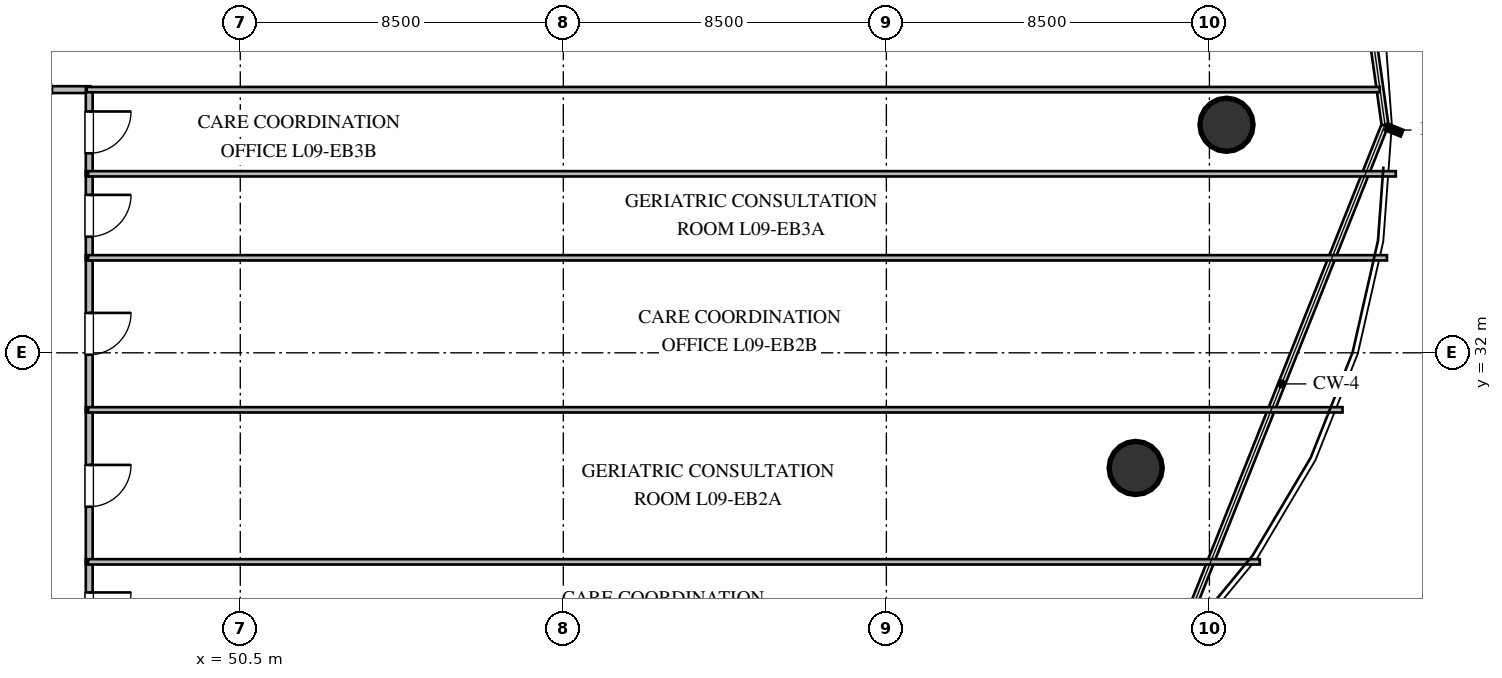
"""IFC4 building model, lengths in metres.
Left out: names, types, materials, properties, quantities, classifications, styles, units other than length and angle.
Written with IfcOpenShell. Run it as: python <this file> out.ifc"""

import sys

from ifc_helpers import new_model, si_unit, direction, frame, frame_2d, origin, origin_2d, place, context, subcontext, project, spatial, rectangle, circle, extrude, element, fill, save


model = new_model("IFC4")
c1 = context("Model", 3, precision=1e-05, world=origin(), true_north=direction((0.0, 1.0)))
c2 = subcontext(c1, "Body", "Model", "MODEL_VIEW")
j1 = project(units=[si_unit("LENGTHUNIT", "METRE"), si_unit("PLANEANGLEUNIT", "RADIAN")], contexts=[c1])
p1 = place(None, origin())
s1 = spatial("IfcSite", under=j1, at=p1, CompositionType="ELEMENT")
p2 = place(p1, origin())
s2 = spatial("IfcBuilding", under=s1, at=p2, CompositionType="ELEMENT")
p3 = place(p2, frame((0.0, 0.0, 38.4)))
s3 = spatial("IfcBuildingStorey", under=s2, at=p3, CompositionType="ELEMENT", Elevation=38.4)
for number, where, z_axis, x_axis in (
    (1, (76.45, 38.0, 0.0), (0.0, 0.0, 1.0), (1.0, 0.0, 0.0)),
    (2, (74.06, 28.97, 0.0), (0.0, 0.0, 1.0), (1.0, 0.0, 0.0)),
):
    element("IfcColumn", number, at=place(p3, frame(where, z_axis=z_axis, x_axis=x_axis)), inside=s3, PredefinedType="COLUMN", context=c2, shape_type="SweptSolid", body=[
        extrude(circle(Radius=0.7, at=origin_2d()), origin(), (0.0, 0.0, 1.0), 3.6),
    ])
p4 = place(p3, frame((43.435, 38.925, 0.0), z_axis=(0.0, 0.0, 1.0), x_axis=(1.0, 0.0, 0.0)))
e3 = element("IfcWall", 3, at=p4, inside=s3, PredefinedType="PARTITIONING", context=c2, shape_type="SweptSolid", body=[
    extrude(rectangle(XDim=3.12, YDim=0.18, at=frame_2d((1.56, 0.0))), origin(), (0.0, 0.0, 1.0), 3.36),
])
p5 = place(p4, frame((1.01, 0.0, 0.0)))
e4 = element("IfcOpeningElement", 4, at=p5, cuts=e3, PredefinedType="OPENING", context=c2, shape_type="SweptSolid", body=[
    extrude(rectangle(XDim=1.1, YDim=2.1, at=frame_2d((0.55, 1.05))), frame((0.0, 0.1, 0.0), z_axis=(0.0, -1.0, 0.0), x_axis=(1.0, 0.0, 0.0)), (0.0, 0.0, 1.0), 0.2),
])
p6 = place(p3, frame((46.525, 26.565, 0.0), z_axis=(0.0, 0.0, 1.0), x_axis=(0.0, -1.0, 0.0)))
e5 = element("IfcWall", 5, at=p6, inside=s3, PredefinedType="PARTITIONING", context=c2, shape_type="SweptSolid", body=[
    extrude(rectangle(XDim=2.84, YDim=0.18, at=frame_2d((1.42, 0.0))), origin(), (0.0, 0.0, 1.0), 3.36),
])
p7 = place(p6, frame((0.87, 0.0, 0.0)))
e6 = element("IfcOpeningElement", 6, at=p7, cuts=e5, PredefinedType="OPENING", context=c2, shape_type="SweptSolid", body=[
    extrude(rectangle(XDim=1.1, YDim=2.1, at=frame_2d((0.55, 1.05))), frame((0.0, 0.1, 0.0), z_axis=(0.0, -1.0, 0.0), x_axis=(1.0, 0.0, 0.0)), (0.0, 0.0, 1.0), 0.2),
])
p8 = place(p3, frame((46.525, 30.565, 0.0), z_axis=(0.0, 0.0, 1.0), x_axis=(0.0, -1.0, 0.0)))
e7 = element("IfcWall", 7, at=p8, inside=s3, PredefinedType="PARTITIONING", context=c2, shape_type="SweptSolid", body=[
    extrude(rectangle(XDim=4.13, YDim=0.18, at=frame_2d((2.065, 0.0))), origin(), (0.0, 0.0, 1.0), 3.36),
])
p9 = place(p8, frame((1.515, 0.0, 0.0)))
e8 = element("IfcOpeningElement", 8, at=p9, cuts=e7, PredefinedType="OPENING", context=c2, shape_type="SweptSolid", body=[
    extrude(rectangle(XDim=1.1, YDim=2.1, at=frame_2d((0.55, 1.05))), frame((0.0, 0.1, 0.0), z_axis=(0.0, -1.0, 0.0), x_axis=(1.0, 0.0, 0.0)), (0.0, 0.0, 1.0), 0.2),
])
p10 = place(p3, frame((46.525, 34.565, 0.0), z_axis=(0.0, 0.0, 1.0), x_axis=(0.0, -1.0, 0.0)))
e9 = element("IfcWall", 9, at=p10, inside=s3, PredefinedType="PARTITIONING", context=c2, shape_type="SweptSolid", body=[
    extrude(rectangle(XDim=4.13, YDim=0.18, at=frame_2d((2.065, 0.0))), origin(), (0.0, 0.0, 1.0), 3.36),
])
p11 = place(p10, frame((1.515, 0.0, 0.0)))
e10 = element("IfcOpeningElement", 10, at=p11, cuts=e9, PredefinedType="OPENING", context=c2, shape_type="SweptSolid", body=[
    extrude(rectangle(XDim=1.1, YDim=2.1, at=frame_2d((0.55, 1.05))), frame((0.0, 0.1, 0.0), z_axis=(0.0, -1.0, 0.0), x_axis=(1.0, 0.0, 0.0)), (0.0, 0.0, 1.0), 0.2),
])
p12 = place(p3, frame((46.525, 36.775, 0.0), z_axis=(0.0, 0.0, 1.0), x_axis=(0.0, -1.0, 0.0)))
e11 = element("IfcWall", 11, at=p12, inside=s3, PredefinedType="PARTITIONING", context=c2, shape_type="SweptSolid", body=[
    extrude(rectangle(XDim=2.34, YDim=0.18, at=frame_2d((1.17, 0.0))), origin(), (0.0, 0.0, 1.0), 3.36),
])
p13 = place(p12, frame((0.62, 0.0, 0.0)))
e12 = element("IfcOpeningElement", 12, at=p13, cuts=e11, PredefinedType="OPENING", context=c2, shape_type="SweptSolid", body=[
    extrude(rectangle(XDim=1.1, YDim=2.1, at=frame_2d((0.55, 1.05))), frame((0.0, 0.1, 0.0), z_axis=(0.0, -1.0, 0.0), x_axis=(1.0, 0.0, 0.0)), (0.0, 0.0, 1.0), 0.2),
])
p14 = place(p3, frame((46.525, 38.955, 0.0), z_axis=(0.0, 0.0, 1.0), x_axis=(0.0, -1.0, 0.0)))
e13 = element("IfcWall", 13, at=p14, inside=s3, PredefinedType="PARTITIONING", context=c2, shape_type="SweptSolid", body=[
    extrude(rectangle(XDim=2.31, YDim=0.18, at=frame_2d((1.155, 0.0))), origin(), (0.0, 0.0, 1.0), 3.36),
])
p15 = place(p14, frame((0.605, 0.0, 0.0)))
e14 = element("IfcOpeningElement", 14, at=p15, cuts=e13, PredefinedType="OPENING", context=c2, shape_type="SweptSolid", body=[
    extrude(rectangle(XDim=1.1, YDim=2.1, at=frame_2d((0.55, 1.05))), frame((0.0, 0.1, 0.0), z_axis=(0.0, -1.0, 0.0), x_axis=(1.0, 0.0, 0.0)), (0.0, 0.0, 1.0), 0.2),
])
p16 = place(p3, frame((80.48, 38.925, 0.0), z_axis=(0.0, 0.0, 1.0), x_axis=(-1.0, 0.0, 0.0)))
e15 = element("IfcWall", 15, at=p16, inside=s3, PredefinedType="PARTITIONING", context=c2, shape_type="SweptSolid", body=[
    extrude(rectangle(XDim=34.02, YDim=0.14, at=frame_2d((17.01, 0.0))), origin(), (0.0, 0.0, 1.0), 3.36),
])
p17 = place(p3, frame((46.495, 26.5, 0.0), z_axis=(0.0, 0.0, 1.0), x_axis=(1.0, 0.0, 0.0)))
e16 = element("IfcWall", 16, at=p17, inside=s3, PredefinedType="PARTITIONING", context=c2, shape_type="SweptSolid", body=[
    extrude(rectangle(XDim=30.831, YDim=0.14, at=frame_2d((15.416, 0.0))), origin(), (0.0, 0.0, 1.0), 2.89),
])
p18 = place(p3, frame((46.495, 30.5, 0.0), z_axis=(0.0, 0.0, 1.0), x_axis=(1.0, 0.0, 0.0)))
e17 = element("IfcWall", 17, at=p18, inside=s3, PredefinedType="PARTITIONING", context=c2, shape_type="SweptSolid", body=[
    extrude(rectangle(XDim=33.008, YDim=0.14, at=frame_2d((16.504, 0.0))), origin(), (0.0, 0.0, 1.0), 3.36),
])
p19 = place(p3, frame((46.495, 34.5, 0.0), z_axis=(0.0, 0.0, 1.0), x_axis=(1.0, 0.0, 0.0)))
e18 = element("IfcWall", 18, at=p19, inside=s3, PredefinedType="PARTITIONING", context=c2, shape_type="SweptSolid", body=[
    extrude(rectangle(XDim=34.177, YDim=0.14, at=frame_2d((17.088, 0.0))), origin(), (0.0, 0.0, 1.0), 3.36),
])
p20 = place(p3, frame((46.495, 36.71, 0.0), z_axis=(0.0, 0.0, 1.0), x_axis=(1.0, 0.0, 0.0)))
e19 = element("IfcWall", 19, at=p20, inside=s3, PredefinedType="PARTITIONING", context=c2, shape_type="SweptSolid", body=[
    extrude(rectangle(XDim=34.41, YDim=0.14, at=frame_2d((17.205, 0.0))), origin(), (0.0, 0.0, 1.0), 2.89),
])
p21 = place(p7, origin())
e20 = element("IfcDoor", 20, at=p21, inside=s3, OperationType="SINGLE_SWING_LEFT", PredefinedType="DOOR", context=c2, shape_type="SweptSolid", body=[
    extrude(rectangle(XDim=1.1, YDim=2.1, at=frame_2d((0.55, 1.05))), frame((0.0, 0.025, 0.0), z_axis=(0.0, -1.0, 0.0), x_axis=(1.0, 0.0, 0.0)), (0.0, 0.0, 1.0), 0.05),
])
fill(e6, e20)
p22 = place(p9, origin())
e21 = element("IfcDoor", 21, at=p22, inside=s3, OperationType="SINGLE_SWING_LEFT", PredefinedType="DOOR", context=c2, shape_type="SweptSolid", body=[
    extrude(rectangle(XDim=1.1, YDim=2.1, at=frame_2d((0.55, 1.05))), frame((0.0, 0.025, 0.0), z_axis=(0.0, -1.0, 0.0), x_axis=(1.0, 0.0, 0.0)), (0.0, 0.0, 1.0), 0.05),
])
fill(e8, e21)
p23 = place(p11, origin())
e22 = element("IfcDoor", 22, at=p23, inside=s3, OperationType="SINGLE_SWING_LEFT", PredefinedType="DOOR", context=c2, shape_type="SweptSolid", body=[
    extrude(rectangle(XDim=1.1, YDim=2.1, at=frame_2d((0.55, 1.05))), frame((0.0, 0.025, 0.0), z_axis=(0.0, -1.0, 0.0), x_axis=(1.0, 0.0, 0.0)), (0.0, 0.0, 1.0), 0.05),
])
fill(e10, e22)
p24 = place(p13, origin())
e23 = element("IfcDoor", 23, at=p24, inside=s3, OperationType="SINGLE_SWING_LEFT", PredefinedType="DOOR", context=c2, shape_type="SweptSolid", body=[
    extrude(rectangle(XDim=1.1, YDim=2.1, at=frame_2d((0.55, 1.05))), frame((0.0, 0.025, 0.0), z_axis=(0.0, -1.0, 0.0), x_axis=(1.0, 0.0, 0.0)), (0.0, 0.0, 1.0), 0.05),
])
fill(e12, e23)
p25 = place(p15, origin())
e24 = element("IfcDoor", 24, at=p25, inside=s3, OperationType="SINGLE_SWING_LEFT", PredefinedType="DOOR", context=c2, shape_type="SweptSolid", body=[
    extrude(rectangle(XDim=1.1, YDim=2.1, at=frame_2d((0.55, 1.05))), frame((0.0, 0.025, 0.0), z_axis=(0.0, -1.0, 0.0), x_axis=(1.0, 0.0, 0.0)), (0.0, 0.0, 1.0), 0.05),
])
fill(e14, e24)
save(model, sys.argv[1])
